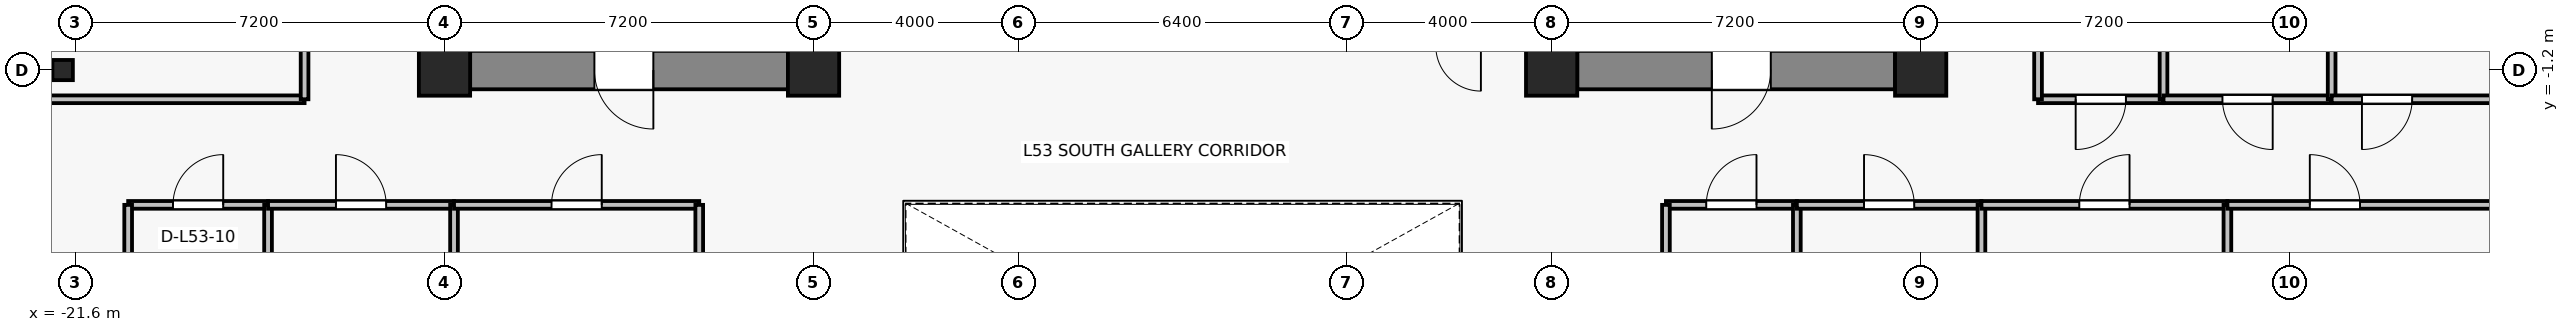
"""IFC4 building model, lengths in metres.
Left out: names, types, materials, properties, quantities, classifications, styles, units other than length and angle.
Written with IfcOpenShell. Run it as: python <this file> out.ifc"""

import sys

from ifc_helpers import new_model, si_unit, direction, frame, frame_2d, origin, origin_2d, place, context, subcontext, project, spatial, rectangle, i_section, extrude, source, transform, mapped, element, fill, save


model = new_model("IFC4")
c1 = context("Model", 3, precision=1e-05, world=origin(), true_north=direction((0.0, 1.0)))
c2 = subcontext(c1, "Body", "Model", "MODEL_VIEW")
j1 = project(units=[si_unit("LENGTHUNIT", "METRE"), si_unit("PLANEANGLEUNIT", "RADIAN")], contexts=[c1])
p1 = place(None, origin())
s1 = spatial("IfcSite", under=j1, at=p1, CompositionType="ELEMENT")
p2 = place(p1, origin())
s2 = spatial("IfcBuilding", under=s1, at=p2, CompositionType="ELEMENT")
p3 = place(p2, frame((0.0, 0.0, 189.1)))
s3 = spatial("IfcBuildingStorey", under=s2, at=p3, CompositionType="ELEMENT", Elevation=189.1)
for number, where, z_axis, x_axis in (
    (1, (-14.4, -1.2, 0.0), (0.0, 0.0, 1.0), (1.0, 0.0, 0.0)),
    (2, (-7.2, -1.2, 0.0), (0.0, 0.0, 1.0), (1.0, 0.0, 0.0)),
    (3, (7.2, -1.2, 0.0), (0.0, 0.0, 1.0), (1.0, 0.0, 0.0)),
    (4, (14.4, -1.2, 0.0), (0.0, 0.0, 1.0), (1.0, 0.0, 0.0)),
):
    element("IfcColumn", number, at=place(p3, frame(where, z_axis=z_axis, x_axis=x_axis)), inside=s3, PredefinedType="COLUMN", context=c2, shape_type="SweptSolid", body=[
        extrude(rectangle(XDim=1.0, YDim=1.0, at=origin_2d()), origin(), (0.0, 0.0, 1.0), 3.3),
    ])
p4 = place(p3, frame((-21.85, -1.2, 0.0), z_axis=(0.0, 0.0, 1.0), x_axis=(1.0, 0.0, 0.0)))
e5 = element("IfcColumn", 5, at=p4, inside=s3, PredefinedType="COLUMN", context=c2, shape_type="SweptSolid", body=[
    extrude(i_section(OverallWidth=0.399, OverallDepth=0.394, WebThickness=0.023, FlangeThickness=0.037, FilletRadius=0.015, at=origin_2d()), origin(), (0.0, 0.0, 1.0), 3.3),
])
p5 = place(p3, frame((-7.7, -1.2, 0.0), z_axis=(0.0, 0.0, 1.0), x_axis=(-1.0, 0.0, 0.0)))
e6 = element("IfcWall", 6, at=p5, inside=s3, PredefinedType="SHEAR", context=c2, shape_type="SweptSolid", body=[
    extrude(rectangle(XDim=6.2, YDim=0.75, at=frame_2d((3.1, 0.0))), origin(), (0.0, 0.0, 1.0), 3.075),
])
p6 = place(p5, frame((2.625, 0.0, 0.0)))
e7 = element("IfcOpeningElement", 7, at=p6, cuts=e6, PredefinedType="OPENING", context=c2, shape_type="SweptSolid", body=[
    extrude(rectangle(XDim=1.15, YDim=2.15, at=frame_2d((0.575, 1.075))), frame((0.0, 0.385, 0.0), z_axis=(0.0, -1.0, 0.0), x_axis=(1.0, 0.0, 0.0)), (0.0, 0.0, 1.0), 0.77),
])
p7 = place(p3, frame((13.9, -1.2, 0.0), z_axis=(0.0, 0.0, 1.0), x_axis=(-1.0, 0.0, 0.0)))
e8 = element("IfcWall", 8, at=p7, inside=s3, PredefinedType="SHEAR", context=c2, shape_type="SweptSolid", body=[
    extrude(rectangle(XDim=6.2, YDim=0.75, at=frame_2d((3.1, 0.0))), origin(), (0.0, 0.0, 1.0), 3.075),
])
p8 = place(p7, frame((2.425, 0.0, 0.0)))
e9 = element("IfcOpeningElement", 9, at=p8, cuts=e8, PredefinedType="OPENING", context=c2, shape_type="SweptSolid", body=[
    extrude(rectangle(XDim=1.15, YDim=2.15, at=frame_2d((0.575, 1.075))), frame((0.0, 0.385, 0.0), z_axis=(0.0, -1.0, 0.0), x_axis=(1.0, 0.0, 0.0)), (0.0, 0.0, 1.0), 0.77),
])
p9 = place(p3, frame((-20.572, -3.83, 0.0), z_axis=(0.0, 0.0, 1.0), x_axis=(1.0, 0.0, 0.0)))
e10 = element("IfcWall", 10, at=p9, inside=s3, PredefinedType="PARTITIONING", context=c2, shape_type="SweptSolid", body=[
    extrude(rectangle(XDim=2.729, YDim=0.15, at=frame_2d((1.365, 0.0))), origin(), (0.0, 0.0, 1.0), 3.075),
])
p10 = place(p9, frame((0.875, 0.0, 0.0)))
e11 = element("IfcOpeningElement", 11, at=p10, cuts=e10, PredefinedType="OPENING", context=c2, shape_type="SweptSolid", body=[
    extrude(rectangle(XDim=0.98, YDim=2.15, at=frame_2d((0.49, 1.075))), frame((0.0, 0.085, 0.0), z_axis=(0.0, -1.0, 0.0), x_axis=(1.0, 0.0, 0.0)), (0.0, 0.0, 1.0), 0.17),
])
for number, where, z_axis, x_axis in (
    (12, (-20.572, -7.12, 0.0), (0.0, 0.0, 1.0), (0.0, 1.0, 0.0)),
    (13, (-17.843, -3.83, 0.0), (0.0, 0.0, 1.0), (0.0, -1.0, 0.0)),
):
    element("IfcWall", number, at=place(p3, frame(where, z_axis=z_axis, x_axis=x_axis)), inside=s3, PredefinedType="PARTITIONING", context=c2, shape_type="SweptSolid", body=[
        extrude(rectangle(XDim=3.29, YDim=0.15, at=frame_2d((1.645, 0.0))), origin(), (0.0, 0.0, 1.0), 2.665),
    ])
p11 = place(p3, frame((-17.843, -3.83, 0.0), z_axis=(0.0, 0.0, 1.0), x_axis=(1.0, 0.0, 0.0)))
e14 = element("IfcWall", 14, at=p11, inside=s3, PredefinedType="PARTITIONING", context=c2, shape_type="SweptSolid", body=[
    extrude(rectangle(XDim=3.628, YDim=0.15, at=frame_2d((1.814, 0.0))), origin(), (0.0, 0.0, 1.0), 2.565),
])
p12 = place(p11, frame((1.324, 0.0, 0.0)))
e15 = element("IfcOpeningElement", 15, at=p12, cuts=e14, PredefinedType="OPENING", context=c2, shape_type="SweptSolid", body=[
    extrude(rectangle(XDim=0.98, YDim=2.15, at=frame_2d((0.49, 1.075))), frame((0.0, 0.085, 0.0), z_axis=(0.0, -1.0, 0.0), x_axis=(1.0, 0.0, 0.0)), (0.0, 0.0, 1.0), 0.17),
])
p13 = place(p3, frame((-14.214, -3.83, 0.0), z_axis=(0.0, 0.0, 1.0), x_axis=(0.0, -1.0, 0.0)))
e16 = element("IfcWall", 16, at=p13, inside=s3, PredefinedType="PARTITIONING", context=c2, shape_type="SweptSolid", body=[
    extrude(rectangle(XDim=3.29, YDim=0.15, at=frame_2d((1.645, 0.0))), origin(), (0.0, 0.0, 1.0), 2.565),
])
p14 = place(p3, frame((-14.214, -3.83, 0.0), z_axis=(0.0, 0.0, 1.0), x_axis=(1.0, 0.0, 0.0)))
e17 = element("IfcWall", 17, at=p14, inside=s3, PredefinedType="PARTITIONING", context=c2, shape_type="SweptSolid", body=[
    extrude(rectangle(XDim=4.784, YDim=0.15, at=frame_2d((2.392, 0.0))), origin(), (0.0, 0.0, 1.0), 2.565),
])
p15 = place(p14, frame((1.902, 0.0, 0.0)))
e18 = element("IfcOpeningElement", 18, at=p15, cuts=e17, PredefinedType="OPENING", context=c2, shape_type="SweptSolid", body=[
    extrude(rectangle(XDim=0.98, YDim=2.15, at=frame_2d((0.49, 1.075))), frame((0.0, 0.085, 0.0), z_axis=(0.0, -1.0, 0.0), x_axis=(1.0, 0.0, 0.0)), (0.0, 0.0, 1.0), 0.17),
])
p16 = place(p3, frame((-9.43, -3.83, 0.0), z_axis=(0.0, 0.0, 1.0), x_axis=(0.0, -1.0, 0.0)))
e19 = element("IfcWall", 19, at=p16, inside=s3, PredefinedType="PARTITIONING", context=c2, shape_type="SweptSolid", body=[
    extrude(rectangle(XDim=3.29, YDim=0.15, at=frame_2d((1.645, 0.0))), origin(), (0.0, 0.0, 1.0), 2.665),
])
p17 = place(p3, frame((9.43, -3.83, 0.0), z_axis=(0.0, 0.0, 1.0), x_axis=(1.0, 0.0, 0.0)))
e20 = element("IfcWall", 20, at=p17, inside=s3, PredefinedType="PARTITIONING", context=c2, shape_type="SweptSolid", body=[
    extrude(rectangle(XDim=2.554, YDim=0.15, at=frame_2d((1.277, 0.0))), origin(), (0.0, 0.0, 1.0), 3.075),
])
p18 = place(p17, frame((0.787, 0.0, 0.0)))
e21 = element("IfcOpeningElement", 21, at=p18, cuts=e20, PredefinedType="OPENING", context=c2, shape_type="SweptSolid", body=[
    extrude(rectangle(XDim=0.98, YDim=2.15, at=frame_2d((0.49, 1.075))), frame((0.0, 0.085, 0.0), z_axis=(0.0, -1.0, 0.0), x_axis=(1.0, 0.0, 0.0)), (0.0, 0.0, 1.0), 0.17),
])
for number, where, z_axis, x_axis in (
    (22, (9.43, -7.12, 0.0), (0.0, 0.0, 1.0), (0.0, 1.0, 0.0)),
    (23, (11.984, -3.83, 0.0), (0.0, 0.0, 1.0), (0.0, -1.0, 0.0)),
):
    element("IfcWall", number, at=place(p3, frame(where, z_axis=z_axis, x_axis=x_axis)), inside=s3, PredefinedType="PARTITIONING", context=c2, shape_type="SweptSolid", body=[
        extrude(rectangle(XDim=3.29, YDim=0.15, at=frame_2d((1.645, 0.0))), origin(), (0.0, 0.0, 1.0), 2.665),
    ])
p19 = place(p3, frame((11.984, -3.83, 0.0), z_axis=(0.0, 0.0, 1.0), x_axis=(1.0, 0.0, 0.0)))
e24 = element("IfcWall", 24, at=p19, inside=s3, PredefinedType="PARTITIONING", context=c2, shape_type="SweptSolid", body=[
    extrude(rectangle(XDim=3.602, YDim=0.15, at=frame_2d((1.801, 0.0))), origin(), (0.0, 0.0, 1.0), 2.565),
])
p20 = place(p19, frame((1.311, 0.0, 0.0)))
e25 = element("IfcOpeningElement", 25, at=p20, cuts=e24, PredefinedType="OPENING", context=c2, shape_type="SweptSolid", body=[
    extrude(rectangle(XDim=0.98, YDim=2.15, at=frame_2d((0.49, 1.075))), frame((0.0, 0.085, 0.0), z_axis=(0.0, -1.0, 0.0), x_axis=(1.0, 0.0, 0.0)), (0.0, 0.0, 1.0), 0.17),
])
p21 = place(p3, frame((15.586, -3.83, 0.0), z_axis=(0.0, 0.0, 1.0), x_axis=(0.0, -1.0, 0.0)))
e26 = element("IfcWall", 26, at=p21, inside=s3, PredefinedType="PARTITIONING", context=c2, shape_type="SweptSolid", body=[
    extrude(rectangle(XDim=3.29, YDim=0.15, at=frame_2d((1.645, 0.0))), origin(), (0.0, 0.0, 1.0), 3.075),
])
p22 = place(p3, frame((15.586, -3.83, 0.0), z_axis=(0.0, 0.0, 1.0), x_axis=(1.0, 0.0, 0.0)))
e27 = element("IfcWall", 27, at=p22, inside=s3, PredefinedType="PARTITIONING", context=c2, shape_type="SweptSolid", body=[
    extrude(rectangle(XDim=4.799, YDim=0.15, at=frame_2d((2.399, 0.0))), origin(), (0.0, 0.0, 1.0), 3.075),
])
p23 = place(p22, frame((1.909, 0.0, 0.0)))
e28 = element("IfcOpeningElement", 28, at=p23, cuts=e27, PredefinedType="OPENING", context=c2, shape_type="SweptSolid", body=[
    extrude(rectangle(XDim=0.98, YDim=2.15, at=frame_2d((0.49, 1.075))), frame((0.0, 0.085, 0.0), z_axis=(0.0, -1.0, 0.0), x_axis=(1.0, 0.0, 0.0)), (0.0, 0.0, 1.0), 0.17),
])
p24 = place(p3, frame((20.385, -3.83, 0.0), z_axis=(0.0, 0.0, 1.0), x_axis=(0.0, -1.0, 0.0)))
e29 = element("IfcWall", 29, at=p24, inside=s3, PredefinedType="PARTITIONING", context=c2, shape_type="SweptSolid", body=[
    extrude(rectangle(XDim=3.29, YDim=0.15, at=frame_2d((1.645, 0.0))), origin(), (0.0, 0.0, 1.0), 3.075),
])
p25 = place(p3, frame((20.385, -3.83, 0.0), z_axis=(0.0, 0.0, 1.0), x_axis=(1.0, 0.0, 0.0)))
e30 = element("IfcWall", 30, at=p25, inside=s3, PredefinedType="PARTITIONING", context=c2, shape_type="SweptSolid", body=[
    extrude(rectangle(XDim=6.146, YDim=0.15, at=frame_2d((3.073, 0.0))), origin(), (0.0, 0.0, 1.0), 2.565),
])
p26 = place(p25, frame((1.607, 0.0, 0.0)))
e31 = element("IfcOpeningElement", 31, at=p26, cuts=e30, PredefinedType="OPENING", context=c2, shape_type="SweptSolid", body=[
    extrude(rectangle(XDim=0.98, YDim=2.15, at=frame_2d((0.49, 1.075))), frame((0.0, 0.085, 0.0), z_axis=(0.0, -1.0, 0.0), x_axis=(1.0, 0.0, 0.0)), (0.0, 0.0, 1.0), 0.17),
])
p27 = place(p3, frame((-17.13, -1.77, 0.0), z_axis=(0.0, 0.0, 1.0), x_axis=(-1.0, 0.0, 0.0)))
e32 = element("IfcWall", 32, at=p27, inside=s3, PredefinedType="PARTITIONING", context=c2, shape_type="SweptSolid", body=[
    extrude(rectangle(XDim=5.4, YDim=0.15, at=frame_2d((2.7, 0.0))), origin(), (0.0, 0.0, 1.0), 2.565),
])
p28 = place(p3, frame((-17.13, 13.88, 0.0), z_axis=(0.0, 0.0, 1.0), x_axis=(0.0, -1.0, 0.0)))
e33 = element("IfcWall", 33, at=p28, inside=s3, PredefinedType="PARTITIONING", context=c2, shape_type="SweptSolid", body=[
    extrude(rectangle(XDim=15.65, YDim=0.15, at=frame_2d((7.825, 0.0))), origin(), (0.0, 0.0, 1.0), 2.565),
])
p29 = place(p28, frame((7.335, 0.0, 0.0)))
e34 = element("IfcOpeningElement", 34, at=p29, cuts=e33, PredefinedType="OPENING", context=c2, shape_type="SweptSolid", body=[
    extrude(rectangle(XDim=0.98, YDim=2.15, at=frame_2d((0.49, 1.075))), frame((0.0, 0.085, 0.0), z_axis=(0.0, -1.0, 0.0), x_axis=(1.0, 0.0, 0.0)), (0.0, 0.0, 1.0), 0.17),
])
p30 = place(p3, frame((19.138, -1.77, 0.0), z_axis=(0.0, 0.0, 1.0), x_axis=(-1.0, 0.0, 0.0)))
e35 = element("IfcWall", 35, at=p30, inside=s3, PredefinedType="PARTITIONING", context=c2, shape_type="SweptSolid", body=[
    extrude(rectangle(XDim=2.448, YDim=0.15, at=frame_2d((1.224, 0.0))), origin(), (0.0, 0.0, 1.0), 3.075),
])
p31 = place(p30, frame((0.734, 0.0, 0.0)))
e36 = element("IfcOpeningElement", 36, at=p31, cuts=e35, PredefinedType="OPENING", context=c2, shape_type="SweptSolid", body=[
    extrude(rectangle(XDim=0.98, YDim=2.15, at=frame_2d((0.49, 1.075))), frame((0.0, 0.085, 0.0), z_axis=(0.0, -1.0, 0.0), x_axis=(1.0, 0.0, 0.0)), (0.0, 0.0, 1.0), 0.17),
])
for number, where, z_axis, x_axis in (
    (37, (16.69, -1.77, 0.0), (0.0, 0.0, 1.0), (0.0, 1.0, 0.0)),
    (38, (19.138, 13.88, 0.0), (0.0, 0.0, 1.0), (0.0, -1.0, 0.0)),
):
    element("IfcWall", number, at=place(p3, frame(where, z_axis=z_axis, x_axis=x_axis)), inside=s3, PredefinedType="PARTITIONING", context=c2, shape_type="SweptSolid", body=[
        extrude(rectangle(XDim=15.65, YDim=0.15, at=frame_2d((7.825, 0.0))), origin(), (0.0, 0.0, 1.0), 2.565),
    ])
p32 = place(p3, frame((22.418, -1.77, 0.0), z_axis=(0.0, 0.0, 1.0), x_axis=(-1.0, 0.0, 0.0)))
e39 = element("IfcWall", 39, at=p32, inside=s3, PredefinedType="PARTITIONING", context=c2, shape_type="SweptSolid", body=[
    extrude(rectangle(XDim=3.28, YDim=0.15, at=frame_2d((1.64, 0.0))), origin(), (0.0, 0.0, 1.0), 3.075),
])
p33 = place(p32, frame((1.15, 0.0, 0.0)))
e40 = element("IfcOpeningElement", 40, at=p33, cuts=e39, PredefinedType="OPENING", context=c2, shape_type="SweptSolid", body=[
    extrude(rectangle(XDim=0.98, YDim=2.15, at=frame_2d((0.49, 1.075))), frame((0.0, 0.085, 0.0), z_axis=(0.0, -1.0, 0.0), x_axis=(1.0, 0.0, 0.0)), (0.0, 0.0, 1.0), 0.17),
])
p34 = place(p3, frame((22.418, 13.88, 0.0), z_axis=(0.0, 0.0, 1.0), x_axis=(0.0, -1.0, 0.0)))
e41 = element("IfcWall", 41, at=p34, inside=s3, PredefinedType="PARTITIONING", context=c2, shape_type="SweptSolid", body=[
    extrude(rectangle(XDim=15.65, YDim=0.15, at=frame_2d((7.825, 0.0))), origin(), (0.0, 0.0, 1.0), 2.565),
])
p35 = place(p3, frame((26.53, -1.77, 0.0), z_axis=(0.0, 0.0, 1.0), x_axis=(-1.0, 0.0, 0.0)))
e42 = element("IfcWall", 42, at=p35, inside=s3, PredefinedType="PARTITIONING", context=c2, shape_type="SweptSolid", body=[
    extrude(rectangle(XDim=4.112, YDim=0.15, at=frame_2d((2.056, 0.0))), origin(), (0.0, 0.0, 1.0), 2.565),
])
p36 = place(p35, frame((2.541, 0.0, 0.0)))
e43 = element("IfcOpeningElement", 43, at=p36, cuts=e42, PredefinedType="OPENING", context=c2, shape_type="SweptSolid", body=[
    extrude(rectangle(XDim=0.98, YDim=2.15, at=frame_2d((0.49, 1.075))), frame((0.0, 0.085, 0.0), z_axis=(0.0, -1.0, 0.0), x_axis=(1.0, 0.0, 0.0)), (0.0, 0.0, 1.0), 0.17),
])
m1 = source(origin(), c2, "Body", "SweptSolid", [
    extrude(rectangle(XDim=1.15, YDim=2.15, at=frame_2d((0.575, 1.075))), frame((0.0, 0.025, 0.0), z_axis=(0.0, -1.0, 0.0), x_axis=(1.0, 0.0, 0.0)), (0.0, 0.0, 1.0), 0.05),
])
p37 = place(p6, origin())
e44 = element("IfcDoor", 44, at=p37, inside=s3, OperationType="SINGLE_SWING_LEFT", PredefinedType="DOOR", context=c2, shape_type="MappedRepresentation", body=[
    mapped(m1, transform((0.0, 0.0, 0.0), x_axis=(1.0, 0.0, 0.0), y_axis=(0.0, 1.0, 0.0), z_axis=(0.0, 0.0, 1.0), scale=1.0)),
])
fill(e7, e44)
p38 = place(p8, origin())
e45 = element("IfcDoor", 45, at=p38, inside=s3, OperationType="SINGLE_SWING_RIGHT", PredefinedType="DOOR", context=c2, shape_type="MappedRepresentation", body=[
    mapped(m1, transform((0.0, 0.0, 0.0), x_axis=(1.0, 0.0, 0.0), y_axis=(0.0, 1.0, 0.0), z_axis=(0.0, 0.0, 1.0), scale=1.0)),
])
fill(e9, e45)
m2 = source(origin(), c2, "Body", "SweptSolid", [
    extrude(rectangle(XDim=0.98, YDim=2.15, at=frame_2d((0.49, 1.075))), frame((0.0, 0.025, 0.0), z_axis=(0.0, -1.0, 0.0), x_axis=(1.0, 0.0, 0.0)), (0.0, 0.0, 1.0), 0.05),
])
p39 = place(p10, origin())
e46 = element("IfcDoor", 46, at=p39, inside=s3, OperationType="SINGLE_SWING_RIGHT", PredefinedType="DOOR", context=c2, shape_type="MappedRepresentation", body=[
    mapped(m2, transform((0.0, 0.0, 0.0), x_axis=(1.0, 0.0, 0.0), y_axis=(0.0, 1.0, 0.0), z_axis=(0.0, 0.0, 1.0), scale=1.0)),
])
fill(e11, e46)
p40 = place(p12, origin())
e47 = element("IfcDoor", 47, at=p40, inside=s3, OperationType="SINGLE_SWING_LEFT", PredefinedType="DOOR", context=c2, shape_type="MappedRepresentation", body=[
    mapped(m2, transform((0.0, 0.0, 0.0), x_axis=(1.0, 0.0, 0.0), y_axis=(0.0, 1.0, 0.0), z_axis=(0.0, 0.0, 1.0), scale=1.0)),
])
fill(e15, e47)
p41 = place(p15, origin())
e48 = element("IfcDoor", 48, at=p41, inside=s3, OperationType="SINGLE_SWING_RIGHT", PredefinedType="DOOR", context=c2, shape_type="MappedRepresentation", body=[
    mapped(m2, transform((0.0, 0.0, 0.0), x_axis=(1.0, 0.0, 0.0), y_axis=(0.0, 1.0, 0.0), z_axis=(0.0, 0.0, 1.0), scale=1.0)),
])
fill(e18, e48)
p42 = place(p18, origin())
e49 = element("IfcDoor", 49, at=p42, inside=s3, OperationType="SINGLE_SWING_RIGHT", PredefinedType="DOOR", context=c2, shape_type="MappedRepresentation", body=[
    mapped(m2, transform((0.0, 0.0, 0.0), x_axis=(1.0, 0.0, 0.0), y_axis=(0.0, 1.0, 0.0), z_axis=(0.0, 0.0, 1.0), scale=1.0)),
])
fill(e21, e49)
p43 = place(p20, origin())
e50 = element("IfcDoor", 50, at=p43, inside=s3, OperationType="SINGLE_SWING_LEFT", PredefinedType="DOOR", context=c2, shape_type="MappedRepresentation", body=[
    mapped(m2, transform((0.0, 0.0, 0.0), x_axis=(1.0, 0.0, 0.0), y_axis=(0.0, 1.0, 0.0), z_axis=(0.0, 0.0, 1.0), scale=1.0)),
])
fill(e25, e50)
p44 = place(p23, origin())
e51 = element("IfcDoor", 51, at=p44, inside=s3, OperationType="SINGLE_SWING_RIGHT", PredefinedType="DOOR", context=c2, shape_type="MappedRepresentation", body=[
    mapped(m2, transform((0.0, 0.0, 0.0), x_axis=(1.0, 0.0, 0.0), y_axis=(0.0, 1.0, 0.0), z_axis=(0.0, 0.0, 1.0), scale=1.0)),
])
fill(e28, e51)
p45 = place(p26, origin())
e52 = element("IfcDoor", 52, at=p45, inside=s3, OperationType="SINGLE_SWING_LEFT", PredefinedType="DOOR", context=c2, shape_type="MappedRepresentation", body=[
    mapped(m2, transform((0.0, 0.0, 0.0), x_axis=(1.0, 0.0, 0.0), y_axis=(0.0, 1.0, 0.0), z_axis=(0.0, 0.0, 1.0), scale=1.0)),
])
fill(e31, e52)
p46 = place(p31, origin())
e53 = element("IfcDoor", 53, at=p46, inside=s3, OperationType="SINGLE_SWING_RIGHT", PredefinedType="DOOR", context=c2, shape_type="MappedRepresentation", body=[
    mapped(m2, transform((0.0, 0.0, 0.0), x_axis=(1.0, 0.0, 0.0), y_axis=(0.0, 1.0, 0.0), z_axis=(0.0, 0.0, 1.0), scale=1.0)),
])
fill(e36, e53)
p47 = place(p33, origin())
e54 = element("IfcDoor", 54, at=p47, inside=s3, OperationType="SINGLE_SWING_LEFT", PredefinedType="DOOR", context=c2, shape_type="MappedRepresentation", body=[
    mapped(m2, transform((0.0, 0.0, 0.0), x_axis=(1.0, 0.0, 0.0), y_axis=(0.0, 1.0, 0.0), z_axis=(0.0, 0.0, 1.0), scale=1.0)),
])
fill(e40, e54)
p48 = place(p36, origin())
e55 = element("IfcDoor", 55, at=p48, inside=s3, OperationType="SINGLE_SWING_RIGHT", PredefinedType="DOOR", context=c2, shape_type="MappedRepresentation", body=[
    mapped(m2, transform((0.0, 0.0, 0.0), x_axis=(1.0, 0.0, 0.0), y_axis=(0.0, 1.0, 0.0), z_axis=(0.0, 0.0, 1.0), scale=1.0)),
])
fill(e43, e55)
save(model, sys.argv[1])
